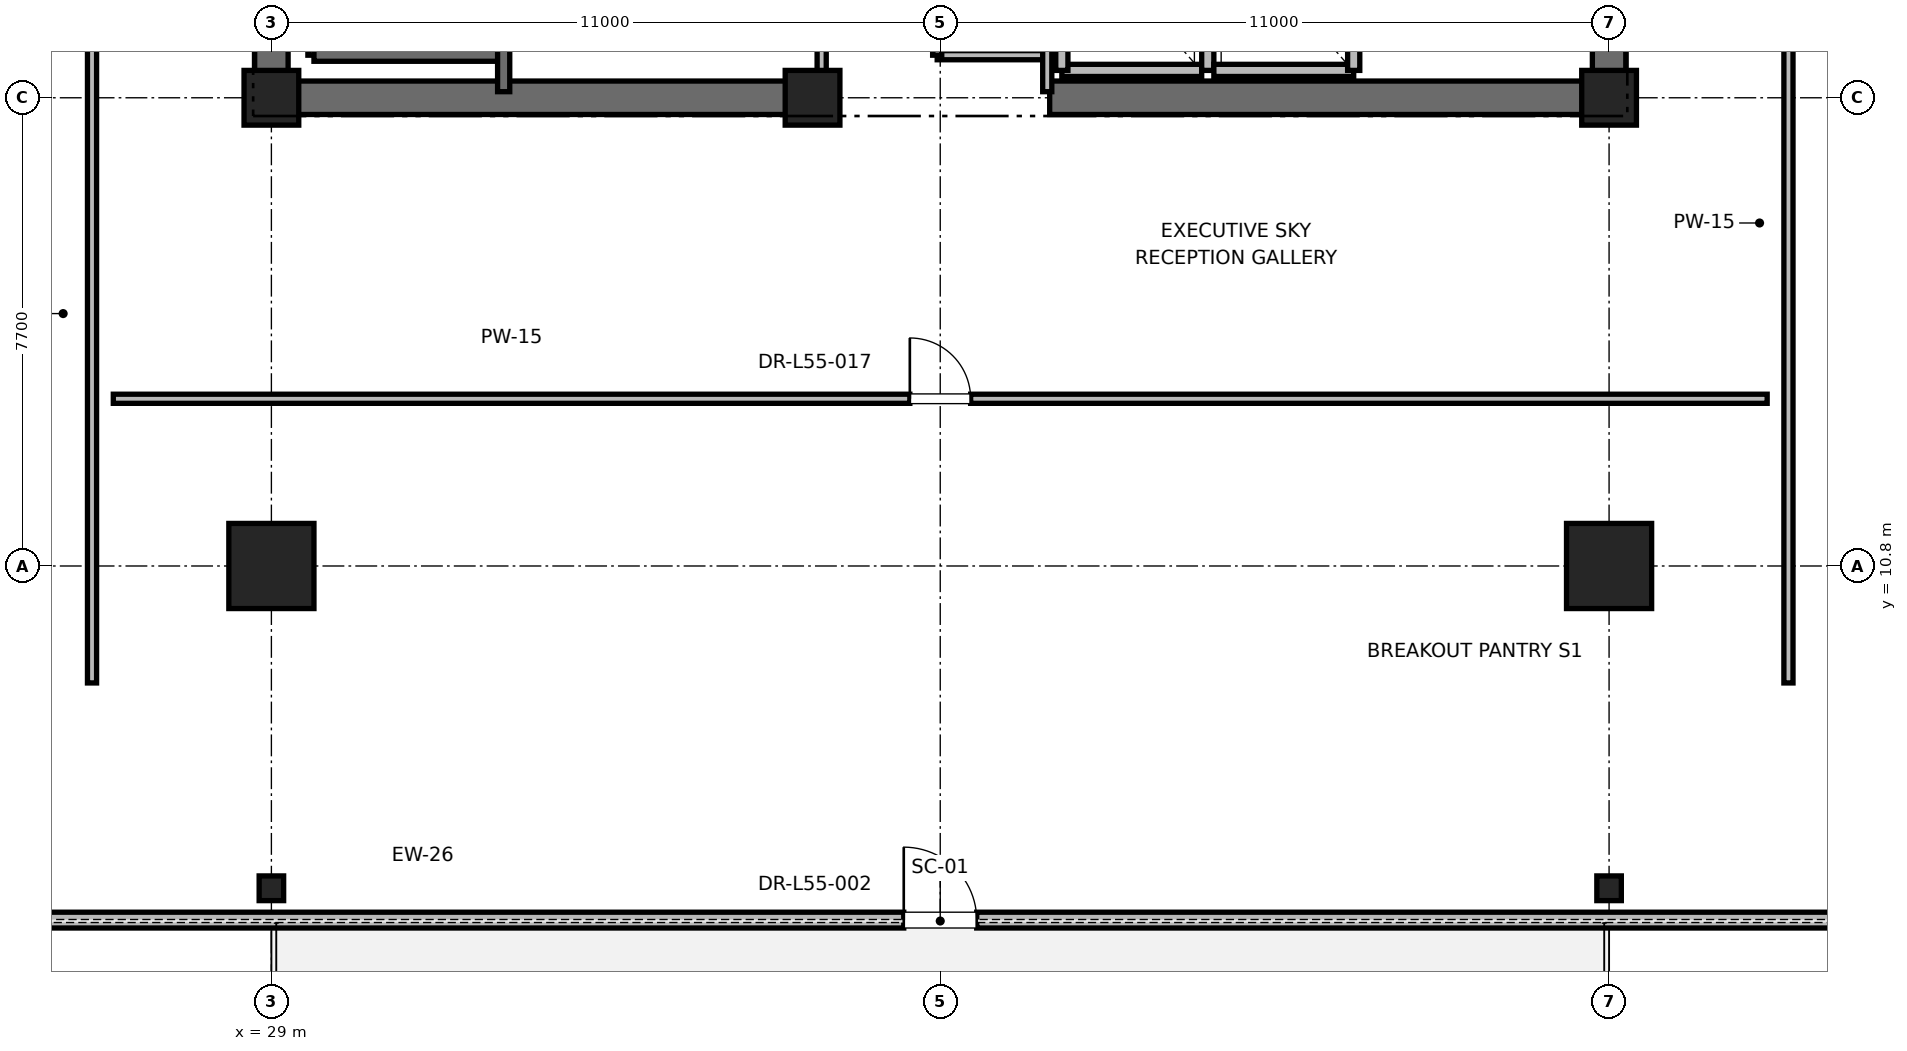
"""IFC4 building model, lengths in metres.
Left out: names, types, materials, properties, quantities, classifications, styles, units other than length and angle.
Written with IfcOpenShell. Run it as: python <this file> out.ifc"""

import sys

from ifc_helpers import new_model, si_unit, direction, frame, frame_2d, origin, origin_2d, place, context, subcontext, project, spatial, rectangle, i_section, extrude, element, fill, save


model = new_model("IFC4")
c1 = context("Model", 3, precision=1e-05, world=origin(), true_north=direction((0.0, 1.0)))
c2 = subcontext(c1, "Body", "Model", "MODEL_VIEW")
j1 = project(units=[si_unit("LENGTHUNIT", "METRE"), si_unit("PLANEANGLEUNIT", "RADIAN")], contexts=[c1])
p1 = place(None, origin())
s1 = spatial("IfcSite", under=j1, at=p1, CompositionType="ELEMENT")
p2 = place(p1, origin())
s2 = spatial("IfcBuilding", under=s1, at=p2, CompositionType="ELEMENT")
p3 = place(p2, frame((0.0, 0.0, 238.2)))
s3 = spatial("IfcBuildingStorey", under=s2, at=p3, CompositionType="ELEMENT", Elevation=238.2)
for number, where, z_axis, x_axis in (
    (1, (29.0, 10.8, 0.0), (0.0, 0.0, 1.0), (1.0, 0.0, 0.0)),
    (2, (51.0, 10.8, 0.0), (0.0, 0.0, 1.0), (1.0, 0.0, 0.0)),
):
    element("IfcColumn", number, at=place(p3, frame(where, z_axis=z_axis, x_axis=x_axis)), inside=s3, PredefinedType="COLUMN", context=c2, shape_type="SweptSolid", body=[
        extrude(rectangle(XDim=1.4, YDim=1.4, at=origin_2d()), origin(), (0.0, 0.0, 1.0), 5.0),
    ])
for number, where, z_axis, x_axis in (
    (3, (29.0, 5.5, 0.0), (0.0, 0.0, 1.0), (1.0, 0.0, 0.0)),
    (4, (51.0, 5.5, 0.0), (0.0, 0.0, 1.0), (1.0, 0.0, 0.0)),
):
    element("IfcColumn", number, at=place(p3, frame(where, z_axis=z_axis, x_axis=x_axis)), inside=s3, PredefinedType="COLUMN", context=c2, shape_type="SweptSolid", body=[
        extrude(i_section(OverallWidth=0.403, OverallDepth=0.406, WebThickness=0.027, FlangeThickness=0.043, FilletRadius=0.015, at=origin_2d()), origin(), (0.0, 0.0, 1.0), 5.0),
    ])
for number, where, z_axis, x_axis in (
    (5, (29.0, 18.5, 0.0), (0.0, 0.0, 1.0), (1.0, 0.0, 0.0)),
    (6, (51.0, 18.5, 0.0), (0.0, 0.0, 1.0), (1.0, 0.0, 0.0)),
    (7, (37.9, 18.5, 0.0), (0.0, 0.0, 1.0), (1.0, 0.0, 0.0)),
):
    element("IfcColumn", number, at=place(p3, frame(where, z_axis=z_axis, x_axis=x_axis)), inside=s3, PredefinedType="PILASTER", context=c2, shape_type="SweptSolid", body=[
        extrude(rectangle(XDim=0.9, YDim=0.9, at=origin_2d()), origin(), (0.0, 0.0, 1.0), 5.0),
    ])
for number, where, z_axis, x_axis in (
    (8, (29.0, 18.5, 0.0), (0.0, 0.0, 1.0), (1.0, 0.0, 0.0)),
    (9, (41.8, 18.5, 0.0), (0.0, 0.0, 1.0), (1.0, 0.0, 0.0)),
):
    element("IfcWall", number, at=place(p3, frame(where, z_axis=z_axis, x_axis=x_axis)), inside=s3, PredefinedType="SHEAR", context=c2, shape_type="SweptSolid", body=[
        extrude(rectangle(XDim=9.2, YDim=0.55, at=frame_2d((4.6, 0.0))), origin(), (0.0, 0.0, 1.0), 4.785),
    ])
p4 = place(p3, frame((29.0, 18.5, 0.0), z_axis=(0.0, 0.0, 1.0), x_axis=(0.0, 1.0, 0.0)))
e10 = element("IfcWall", 10, at=p4, inside=s3, PredefinedType="SHEAR", context=c2, shape_type="SweptSolid", body=[
    extrude(rectangle(XDim=8.8, YDim=0.55, at=frame_2d((4.4, 0.0))), origin(), (0.0, 0.0, 1.0), 4.785),
])
p5 = place(p3, frame((51.0, 18.5, 0.0), z_axis=(0.0, 0.0, 1.0), x_axis=(0.0, 1.0, 0.0)))
e11 = element("IfcWall", 11, at=p5, inside=s3, PredefinedType="SHEAR", context=c2, shape_type="SweptSolid", body=[
    extrude(rectangle(XDim=5.8, YDim=0.55, at=frame_2d((2.9, 0.0))), origin(), (0.0, 0.0, 1.0), 4.785),
])
p6 = place(p3, frame((17.779, 4.977, 0.0), z_axis=(0.0, 0.0, 1.0), x_axis=(1.0, 0.0, 0.0)))
e12 = element("IfcWall", 12, at=p6, inside=s3, PredefinedType="PARAPET", context=c2, shape_type="SweptSolid", body=[
    extrude(rectangle(XDim=44.441, YDim=0.26, at=frame_2d((22.221, 0.0))), origin(), (0.0, 0.0, 1.0), 4.047),
])
p7 = place(p6, frame((4.2, 0.0, 0.85)))
e13 = element("IfcOpeningElement", 13, at=p7, cuts=e12, PredefinedType="OPENING", context=c2, shape_type="SweptSolid", body=[
    extrude(rectangle(XDim=1.6, YDim=2.1, at=frame_2d((0.8, 1.05))), frame((0.0, 0.13, 0.0), z_axis=(0.0, -1.0, 0.0), x_axis=(1.0, 0.0, 0.0)), (0.0, 0.0, 1.0), 0.26),
])
p8 = place(p6, frame((21.621, 0.0, 0.0)))
e14 = element("IfcOpeningElement", 14, at=p8, cuts=e12, PredefinedType="OPENING", context=c2, shape_type="SweptSolid", body=[
    extrude(rectangle(XDim=1.2, YDim=2.2, at=frame_2d((0.6, 1.1))), frame((0.0, 0.13, 0.0), z_axis=(0.0, -1.0, 0.0), x_axis=(1.0, 0.0, 0.0)), (0.0, 0.0, 1.0), 0.26),
])
p9 = place(p6, frame((38.641, 0.0, 0.85)))
e15 = element("IfcOpeningElement", 15, at=p9, cuts=e12, PredefinedType="OPENING", context=c2, shape_type="SweptSolid", body=[
    extrude(rectangle(XDim=1.6, YDim=2.1, at=frame_2d((0.8, 1.05))), frame((0.0, 0.13, 0.0), z_axis=(0.0, -1.0, 0.0), x_axis=(1.0, 0.0, 0.0)), (0.0, 0.0, 1.0), 0.26),
])
p10 = place(p3, frame((29.7, 19.2, 0.0), z_axis=(0.0, 0.0, 1.0), x_axis=(0.0, 1.0, 0.0)))
e16 = element("IfcWall", 16, at=p10, inside=s3, PredefinedType="SOLIDWALL", context=c2, shape_type="SweptSolid", body=[
    extrude(rectangle(XDim=8.15, YDim=0.2, at=frame_2d((4.075, 0.0))), origin(), (0.0, 0.0, 1.0), 4.785),
])
p11 = place(p3, frame((29.7, 19.2, 0.0), z_axis=(0.0, 0.0, 1.0), x_axis=(1.0, 0.0, 0.0)))
e17 = element("IfcWall", 17, at=p11, inside=s3, PredefinedType="SOLIDWALL", context=c2, shape_type="SweptSolid", body=[
    extrude(rectangle(XDim=3.12, YDim=0.2, at=frame_2d((1.56, 0.0))), origin(), (0.0, 0.0, 1.0), 4.785),
])
p12 = place(p3, frame((32.82, 18.6, 0.0), z_axis=(0.0, 0.0, 1.0), x_axis=(0.0, 1.0, 0.0)))
e18 = element("IfcWall", 18, at=p12, inside=s3, PredefinedType="SOLIDWALL", context=c2, shape_type="SweptSolid", body=[
    extrude(rectangle(XDim=8.78, YDim=0.2, at=frame_2d((4.39, 0.0))), origin(), (0.0, 0.0, 1.0), 4.785),
])
p13 = place(p3, frame((42.0, 18.95, 0.0), z_axis=(0.0, 0.0, 1.0), x_axis=(1.0, 0.0, 0.0)))
e19 = element("IfcWall", 19, at=p13, inside=s3, PredefinedType="SOLIDWALL", context=c2, shape_type="SweptSolid", body=[
    extrude(rectangle(XDim=2.3, YDim=0.2, at=frame_2d((1.15, 0.0))), origin(), (0.0, 0.0, 1.0), 3.765),
])
p14 = place(p3, frame((42.0, 21.55, 0.0), z_axis=(0.0, 0.0, 1.0), x_axis=(0.0, -1.0, 0.0)))
e20 = element("IfcWall", 20, at=p14, inside=s3, PredefinedType="SOLIDWALL", context=c2, shape_type="SweptSolid", body=[
    extrude(rectangle(XDim=2.6, YDim=0.2, at=frame_2d((1.3, 0.0))), origin(), (0.0, 0.0, 1.0), 3.765),
])
p15 = place(p3, frame((44.4, 18.95, 0.0), z_axis=(0.0, 0.0, 1.0), x_axis=(0.0, 1.0, 0.0)))
e21 = element("IfcWall", 21, at=p15, inside=s3, PredefinedType="SOLIDWALL", context=c2, shape_type="SweptSolid", body=[
    extrude(rectangle(XDim=2.6, YDim=0.2, at=frame_2d((1.3, 0.0))), origin(), (0.0, 0.0, 1.0), 4.785),
])
p16 = place(p3, frame((44.5, 18.95, 0.0), z_axis=(0.0, 0.0, 1.0), x_axis=(1.0, 0.0, 0.0)))
e22 = element("IfcWall", 22, at=p16, inside=s3, PredefinedType="SOLIDWALL", context=c2, shape_type="SweptSolid", body=[
    extrude(rectangle(XDim=2.3, YDim=0.2, at=frame_2d((1.15, 0.0))), origin(), (0.0, 0.0, 1.0), 4.785),
])
p17 = place(p3, frame((46.8, 18.95, 0.0), z_axis=(0.0, 0.0, 1.0), x_axis=(0.0, 1.0, 0.0)))
e23 = element("IfcWall", 23, at=p17, inside=s3, PredefinedType="SOLIDWALL", context=c2, shape_type="SweptSolid", body=[
    extrude(rectangle(XDim=2.6, YDim=0.2, at=frame_2d((1.3, 0.0))), origin(), (0.0, 0.0, 1.0), 4.785),
])
p18 = place(p3, frame((39.95, 19.2, 0.0), z_axis=(0.0, 0.0, 1.0), x_axis=(1.0, 0.0, 0.0)))
e24 = element("IfcWall", 24, at=p18, inside=s3, PredefinedType="PARTITIONING", context=c2, shape_type="SweptSolid", body=[
    extrude(rectangle(XDim=1.81, YDim=0.15, at=frame_2d((0.905, 0.0))), origin(), (0.0, 0.0, 1.0), 2.85),
])
p19 = place(p3, frame((41.76, 18.6, 0.0), z_axis=(0.0, 0.0, 1.0), x_axis=(0.0, 1.0, 0.0)))
e25 = element("IfcWall", 25, at=p19, inside=s3, PredefinedType="PARTITIONING", context=c2, shape_type="SweptSolid", body=[
    extrude(rectangle(XDim=3.6, YDim=0.15, at=frame_2d((1.8, 0.0))), origin(), (0.0, 0.0, 1.0), 2.85),
])
p20 = place(p3, frame((39.95, 19.2, 0.0), z_axis=(0.0, 0.0, 1.0), x_axis=(0.0, 1.0, 0.0)))
e26 = element("IfcWall", 26, at=p20, inside=s3, PredefinedType="PARTITIONING", context=c2, shape_type="SweptSolid", body=[
    extrude(rectangle(XDim=3.0, YDim=0.15, at=frame_2d((1.5, 0.0))), origin(), (0.0, 0.0, 1.0), 2.85),
])
p21 = place(p20, frame((1.05, 0.0, 0.0)))
e27 = element("IfcOpeningElement", 27, at=p21, cuts=e26, PredefinedType="OPENING", context=c2, shape_type="SweptSolid", body=[
    extrude(rectangle(XDim=0.9, YDim=2.1, at=frame_2d((0.45, 1.05))), frame((0.0, 0.075, 0.0), z_axis=(0.0, -1.0, 0.0), x_axis=(1.0, 0.0, 0.0)), (0.0, 0.0, 1.0), 0.15),
])
p22 = place(p3, frame((38.05, 18.6, 0.0), z_axis=(0.0, 0.0, 1.0), x_axis=(0.0, 1.0, 0.0)))
e28 = element("IfcWall", 28, at=p22, inside=s3, PredefinedType="PARTITIONING", context=c2, shape_type="SweptSolid", body=[
    extrude(rectangle(XDim=8.78, YDim=0.15, at=frame_2d((4.39, 0.0))), origin(), (0.0, 0.0, 1.0), 2.85),
])
p23 = place(p22, frame((3.89, 0.0, 0.0)))
e29 = element("IfcOpeningElement", 29, at=p23, cuts=e28, PredefinedType="OPENING", context=c2, shape_type="SweptSolid", body=[
    extrude(rectangle(XDim=1.0, YDim=2.15, at=frame_2d((0.5, 1.075))), frame((0.0, 0.075, 0.0), z_axis=(0.0, -1.0, 0.0), x_axis=(1.0, 0.0, 0.0)), (0.0, 0.0, 1.0), 0.15),
])
p24 = place(p3, frame((26.4, 13.55, 0.0), z_axis=(0.0, 0.0, 1.0), x_axis=(1.0, 0.0, 0.0)))
e30 = element("IfcWall", 30, at=p24, inside=s3, PredefinedType="PARTITIONING", context=c2, shape_type="SweptSolid", body=[
    extrude(rectangle(XDim=27.2, YDim=0.15, at=frame_2d((13.6, 0.0))), origin(), (0.0, 0.0, 1.0), 2.85),
])
p25 = place(p24, frame((13.1, 0.0, 0.0)))
e31 = element("IfcOpeningElement", 31, at=p25, cuts=e30, PredefinedType="OPENING", context=c2, shape_type="SweptSolid", body=[
    extrude(rectangle(XDim=1.0, YDim=2.15, at=frame_2d((0.5, 1.075))), frame((0.0, 0.075, 0.0), z_axis=(0.0, -1.0, 0.0), x_axis=(1.0, 0.0, 0.0)), (0.0, 0.0, 1.0), 0.15),
])
p26 = place(p3, frame((26.05, 8.877, 0.0), z_axis=(0.0, 0.0, 1.0), x_axis=(0.0, 1.0, 0.0)))
e32 = element("IfcWall", 32, at=p26, inside=s3, PredefinedType="PARTITIONING", context=c2, shape_type="SweptSolid", body=[
    extrude(rectangle(XDim=15.644, YDim=0.15, at=frame_2d((7.822, 0.0))), origin(), (0.0, 0.0, 1.0), 2.85),
])
p27 = place(p26, frame((12.149, 0.0, 0.0)))
e33 = element("IfcOpeningElement", 33, at=p27, cuts=e32, PredefinedType="OPENING", context=c2, shape_type="SweptSolid", body=[
    extrude(rectangle(XDim=1.0, YDim=2.15, at=frame_2d((0.5, 1.075))), frame((0.0, 0.075, 0.0), z_axis=(0.0, -1.0, 0.0), x_axis=(1.0, 0.0, 0.0)), (0.0, 0.0, 1.0), 0.15),
])
p28 = place(p3, frame((53.95, 8.877, 0.0), z_axis=(0.0, 0.0, 1.0), x_axis=(0.0, 1.0, 0.0)))
e34 = element("IfcWall", 34, at=p28, inside=s3, PredefinedType="PARTITIONING", context=c2, shape_type="SweptSolid", body=[
    extrude(rectangle(XDim=21.603, YDim=0.15, at=frame_2d((10.802, 0.0))), origin(), (0.0, 0.0, 1.0), 2.85),
])
p29 = place(p28, frame((15.128, 0.0, 0.0)))
e35 = element("IfcOpeningElement", 35, at=p29, cuts=e34, PredefinedType="OPENING", context=c2, shape_type="SweptSolid", body=[
    extrude(rectangle(XDim=1.0, YDim=2.15, at=frame_2d((0.5, 1.075))), frame((0.0, 0.075, 0.0), z_axis=(0.0, -1.0, 0.0), x_axis=(1.0, 0.0, 0.0)), (0.0, 0.0, 1.0), 0.15),
])
p30 = place(p8, origin())
e36 = element("IfcDoor", 36, at=p30, inside=s3, OperationType="SINGLE_SWING_LEFT", PredefinedType="DOOR", context=c2, shape_type="SweptSolid", body=[
    extrude(rectangle(XDim=1.2, YDim=2.2, at=frame_2d((0.6, 1.1))), frame((0.0, 0.025, 0.0), z_axis=(0.0, -1.0, 0.0), x_axis=(1.0, 0.0, 0.0)), (0.0, 0.0, 1.0), 0.05),
])
fill(e14, e36)
p31 = place(p25, origin())
e37 = element("IfcDoor", 37, at=p31, inside=s3, OperationType="SINGLE_SWING_LEFT", PredefinedType="DOOR", context=c2, shape_type="SweptSolid", body=[
    extrude(rectangle(XDim=1.0, YDim=2.15, at=frame_2d((0.5, 1.075))), frame((0.0, 0.025, 0.0), z_axis=(0.0, -1.0, 0.0), x_axis=(1.0, 0.0, 0.0)), (0.0, 0.0, 1.0), 0.05),
])
fill(e31, e37)
save(model, sys.argv[1])
